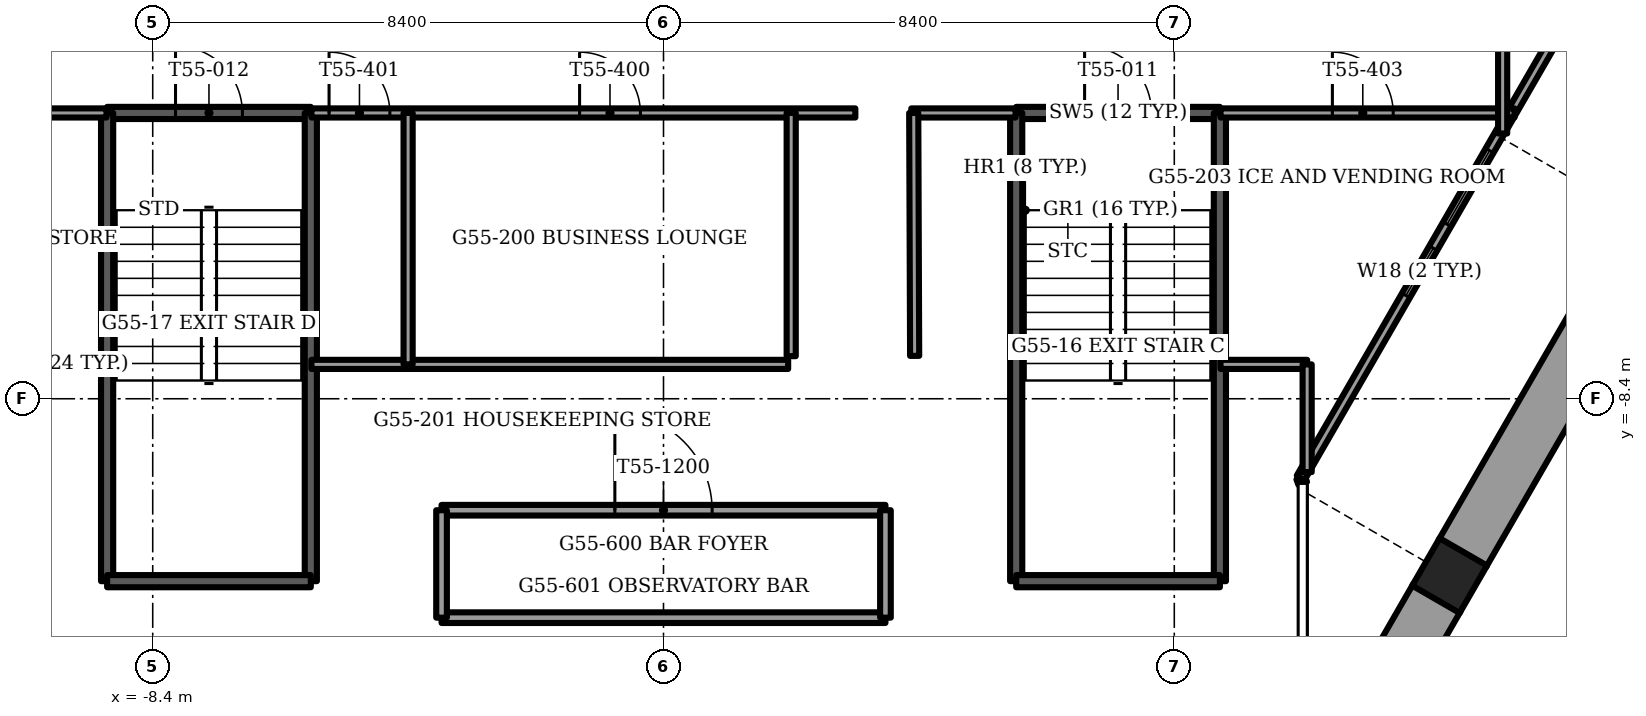
"""IFC4 building model, lengths in metres.
Left out: names, types, materials, properties, quantities, classifications, styles, units other than length and angle.
Written with IfcOpenShell. Run it as: python <this file> out.ifc"""

import sys

from ifc_helpers import new_model, si_unit, direction, frame, frame_2d, origin, origin_2d, place, context, subcontext, project, spatial, rectangle, extrude, element, fill, save


model = new_model("IFC4")
c1 = context("Model", 3, precision=1e-05, world=origin(), true_north=direction((0.0, 1.0)))
c2 = subcontext(c1, "Body", "Model", "MODEL_VIEW")
j1 = project(units=[si_unit("LENGTHUNIT", "METRE"), si_unit("PLANEANGLEUNIT", "RADIAN")], contexts=[c1])
p1 = place(None, origin())
s1 = spatial("IfcSite", under=j1, at=p1, CompositionType="ELEMENT")
p2 = place(p1, origin())
s2 = spatial("IfcBuilding", under=s1, at=p2, CompositionType="ELEMENT")
p3 = place(p2, frame((0.0, 0.0, 222.0)))
s3 = spatial("IfcBuildingStorey", under=s2, at=p3, CompositionType="ELEMENT", Elevation=222.0)
p4 = place(p3, frame((12.928, -11.308, -1.2), z_axis=(0.0, 0.0, 1.0), x_axis=(-0.5, -0.866025403784, 0.0)))
e1 = element("IfcColumn", 1, at=p4, inside=s3, PredefinedType="COLUMN", context=c2, shape_type="SweptSolid", body=[
    extrude(rectangle(XDim=0.9, YDim=0.9, at=origin_2d()), origin(), (0.0, 0.0, 1.0), 3.75),
])
for number, where, z_axis, x_axis in (
    (2, (-12.718, -11.672, 0.0), (0.0, 0.0, 1.0), (0.5, -0.866, 0.0)),
    (3, (10.066, -16.264, 0.0), (0.0, 0.0, 1.0), (0.5, 0.866, 0.0)),
):
    element("IfcWall", number, at=place(p3, frame(where, z_axis=z_axis, x_axis=x_axis)), inside=s3, PredefinedType="PARAPET", context=c2, shape_type="SweptSolid", body=[
        extrude(rectangle(XDim=5.303, YDim=0.9, at=frame_2d((2.651, 0.0))), origin(), (0.0, 0.0, 1.0), 1.1),
    ])
p5 = place(p3, frame((13.138, -10.945, 0.0), z_axis=(0.0, 0.0, 1.0), x_axis=(0.500015433515, 0.866016493057, 0.0)))
e4 = element("IfcWall", 4, at=p5, inside=s3, PredefinedType="PARAPET", context=c2, shape_type="SweptSolid", body=[
    extrude(rectangle(XDim=5.819, YDim=0.9, at=frame_2d((2.909, 0.0))), origin(), (0.0, 0.0, 1.0), 1.1),
])
p6 = place(p3, frame((10.479, -9.7, 0.0), z_axis=(0.0, 0.0, 1.0), x_axis=(0.49999822861, 0.866026426494, 0.0)))
e5 = element("IfcWall", 5, at=p6, inside=s3, PredefinedType="SOLIDWALL", context=c2, shape_type="SweptSolid", body=[
    extrude(rectangle(XDim=10.396, YDim=0.15, at=frame_2d((5.198, 0.0))), origin(), (0.0, 0.0, 1.0), 3.45),
])
p7 = place(p6, frame((3.461, 0.0, 0.15)))
e6 = element("IfcOpeningElement", 6, at=p7, cuts=e5, PredefinedType="OPENING", context=c2, shape_type="SweptSolid", body=[
    extrude(rectangle(XDim=0.9, YDim=2.2, at=frame_2d((0.45, 1.1))), frame((0.0, 0.075, 0.0), z_axis=(0.0, -1.0, 0.0), x_axis=(1.0, 0.0, 0.0)), (0.0, 0.0, 1.0), 0.15),
])
p8 = place(p6, frame((4.814, 0.0, 0.15)))
e7 = element("IfcOpeningElement", 7, at=p8, cuts=e5, PredefinedType="OPENING", context=c2, shape_type="SweptSolid", body=[
    extrude(rectangle(XDim=1.4, YDim=2.2, at=frame_2d((0.7, 1.1))), frame((0.0, 0.075, 0.0), z_axis=(0.0, -1.0, 0.0), x_axis=(1.0, 0.0, 0.0)), (0.0, 0.0, 1.0), 0.15),
])
p9 = place(p3, frame((10.479, -9.7, 0.0), z_axis=(0.0, 0.0, 1.0), x_axis=(0.338543167143, -0.940950861619, 0.0)))
e8 = element("IfcWall", 8, at=p9, inside=s3, PredefinedType="SOLIDWALL", context=c2, shape_type="SweptSolid", body=[
    extrude(rectangle(XDim=0.098, YDim=0.15, at=frame_2d((0.049, 0.0))), origin(), (0.0, 0.0, 1.0), 3.45),
])
p10 = place(p3, frame((5.8, -3.7, -0.3), z_axis=(0.0, 0.0, 1.0), x_axis=(1.0, 0.0, 0.0)))
e9 = element("IfcWall", 9, at=p10, inside=s3, PredefinedType="SOLIDWALL", context=c2, shape_type="SweptSolid", body=[
    extrude(rectangle(XDim=3.35, YDim=0.2, at=frame_2d((1.675, 0.0))), origin(), (0.0, 0.0, 1.0), 3.75),
])
p11 = place(p10, frame((1.125, 0.0, 0.0)))
e10 = element("IfcOpeningElement", 10, at=p11, cuts=e9, PredefinedType="OPENING", context=c2, shape_type="SweptSolid", body=[
    extrude(rectangle(XDim=1.1, YDim=2.1, at=frame_2d((0.55, 1.05))), frame((0.0, 0.1, 0.0), z_axis=(0.0, -1.0, 0.0), x_axis=(1.0, 0.0, 0.0)), (0.0, 0.0, 1.0), 0.2),
])
for number, where, z_axis, x_axis in (
    (11, (5.8, -3.7, -0.3), (0.0, 0.0, 1.0), (0.0, -1.0, 0.0)),
    (12, (9.15, -3.7, -0.3), (0.0, 0.0, 1.0), (0.0, -1.0, 0.0)),
):
    element("IfcWall", number, at=place(p3, frame(where, z_axis=z_axis, x_axis=x_axis)), inside=s3, PredefinedType="SOLIDWALL", context=c2, shape_type="SweptSolid", body=[
        extrude(rectangle(XDim=7.7, YDim=0.2, at=frame_2d((3.85, 0.0))), origin(), (0.0, 0.0, 1.0), 3.75),
    ])
p12 = place(p3, frame((5.8, -11.4, -0.3), z_axis=(0.0, 0.0, 1.0), x_axis=(1.0, 0.0, 0.0)))
e13 = element("IfcWall", 13, at=p12, inside=s3, PredefinedType="SOLIDWALL", context=c2, shape_type="SweptSolid", body=[
    extrude(rectangle(XDim=3.35, YDim=0.2, at=frame_2d((1.675, 0.0))), origin(), (0.0, 0.0, 1.0), 3.75),
])
p13 = place(p3, frame((-9.15, -3.7, -0.3), z_axis=(0.0, 0.0, 1.0), x_axis=(1.0, 0.0, 0.0)))
e14 = element("IfcWall", 14, at=p13, inside=s3, PredefinedType="SOLIDWALL", context=c2, shape_type="SweptSolid", body=[
    extrude(rectangle(XDim=3.35, YDim=0.2, at=frame_2d((1.675, 0.0))), origin(), (0.0, 0.0, 1.0), 3.75),
])
p14 = place(p13, frame((1.125, 0.0, 0.0)))
e15 = element("IfcOpeningElement", 15, at=p14, cuts=e14, PredefinedType="OPENING", context=c2, shape_type="SweptSolid", body=[
    extrude(rectangle(XDim=1.1, YDim=2.1, at=frame_2d((0.55, 1.05))), frame((0.0, 0.1, 0.0), z_axis=(0.0, -1.0, 0.0), x_axis=(1.0, 0.0, 0.0)), (0.0, 0.0, 1.0), 0.2),
])
for number, where, z_axis, x_axis in (
    (16, (-9.15, -3.7, -0.3), (0.0, 0.0, 1.0), (0.0, -1.0, 0.0)),
    (17, (-5.8, -3.7, -0.3), (0.0, 0.0, 1.0), (0.0, -1.0, 0.0)),
):
    element("IfcWall", number, at=place(p3, frame(where, z_axis=z_axis, x_axis=x_axis)), inside=s3, PredefinedType="SOLIDWALL", context=c2, shape_type="SweptSolid", body=[
        extrude(rectangle(XDim=7.7, YDim=0.2, at=frame_2d((3.85, 0.0))), origin(), (0.0, 0.0, 1.0), 3.75),
    ])
p15 = place(p3, frame((-9.15, -11.4, -0.3), z_axis=(0.0, 0.0, 1.0), x_axis=(1.0, 0.0, 0.0)))
e18 = element("IfcWall", 18, at=p15, inside=s3, PredefinedType="SOLIDWALL", context=c2, shape_type="SweptSolid", body=[
    extrude(rectangle(XDim=3.35, YDim=0.2, at=frame_2d((1.675, 0.0))), origin(), (0.0, 0.0, 1.0), 3.75),
])
p16 = place(p3, frame((-10.585, -7.835, 0.0), z_axis=(0.0, 0.0, 1.0), x_axis=(1.0, 0.0, 0.0)))
e19 = element("IfcWall", 19, at=p16, inside=s3, PredefinedType="PARTITIONING", context=c2, shape_type="SweptSolid", body=[
    extrude(rectangle(XDim=1.425, YDim=0.15, at=frame_2d((0.712, 0.0))), origin(), (0.0, 0.0, 1.0), 3.45),
])
p17 = place(p3, frame((-5.79, -7.835, 0.0), z_axis=(0.0, 0.0, 1.0), x_axis=(1.0, 0.0, 0.0)))
e20 = element("IfcWall", 20, at=p17, inside=s3, PredefinedType="PARTITIONING", context=c2, shape_type="SweptSolid", body=[
    extrude(rectangle(XDim=7.84, YDim=0.15, at=frame_2d((3.92, 0.0))), origin(), (0.0, 0.0, 1.0), 3.45),
])
p18 = place(p3, frame((9.16, -7.835, 0.0), z_axis=(0.0, 0.0, 1.0), x_axis=(1.0, 0.0, 0.0)))
e21 = element("IfcWall", 21, at=p18, inside=s3, PredefinedType="PARTITIONING", context=c2, shape_type="SweptSolid", body=[
    extrude(rectangle(XDim=1.425, YDim=0.15, at=frame_2d((0.712, 0.0))), origin(), (0.0, 0.0, 1.0), 3.45),
])
p19 = place(p3, frame((-13.995, -3.7, 0.0), z_axis=(0.0, 0.0, 1.0), x_axis=(1.0, 0.0, 0.0)))
e22 = element("IfcWall", 22, at=p19, inside=s3, PredefinedType="PARTITIONING", context=c2, shape_type="SweptSolid", body=[
    extrude(rectangle(XDim=4.835, YDim=0.15, at=frame_2d((2.417, 0.0))), origin(), (0.0, 0.0, 1.0), 3.45),
])
p20 = place(p19, frame((1.995, 0.0, 0.0)))
e23 = element("IfcOpeningElement", 23, at=p20, cuts=e22, PredefinedType="OPENING", context=c2, shape_type="SweptSolid", body=[
    extrude(rectangle(XDim=1.0, YDim=2.1, at=frame_2d((0.5, 1.05))), frame((0.0, 0.075, 0.0), z_axis=(0.0, -1.0, 0.0), x_axis=(1.0, 0.0, 0.0)), (0.0, 0.0, 1.0), 0.15),
])
p21 = place(p3, frame((-5.79, -3.7, 0.0), z_axis=(0.0, 0.0, 1.0), x_axis=(1.0, 0.0, 0.0)))
e24 = element("IfcWall", 24, at=p21, inside=s3, PredefinedType="PARTITIONING", context=c2, shape_type="SweptSolid", body=[
    extrude(rectangle(XDim=8.945, YDim=0.15, at=frame_2d((4.473, 0.0))), origin(), (0.0, 0.0, 1.0), 3.45),
])
p22 = place(p21, frame((4.41, 0.0, 0.0)))
e25 = element("IfcOpeningElement", 25, at=p22, cuts=e24, PredefinedType="OPENING", context=c2, shape_type="SweptSolid", body=[
    extrude(rectangle(XDim=1.0, YDim=2.1, at=frame_2d((0.5, 1.05))), frame((0.0, 0.075, 0.0), z_axis=(0.0, -1.0, 0.0), x_axis=(1.0, 0.0, 0.0)), (0.0, 0.0, 1.0), 0.15),
])
p23 = place(p21, frame((0.29, 0.0, 0.0)))
e26 = element("IfcOpeningElement", 26, at=p23, cuts=e24, PredefinedType="OPENING", context=c2, shape_type="SweptSolid", body=[
    extrude(rectangle(XDim=1.0, YDim=2.1, at=frame_2d((0.5, 1.05))), frame((0.0, 0.075, 0.0), z_axis=(0.0, -1.0, 0.0), x_axis=(1.0, 0.0, 0.0)), (0.0, 0.0, 1.0), 0.15),
])
p24 = place(p3, frame((4.075, -3.7, 0.0), z_axis=(0.0, 0.0, 1.0), x_axis=(1.0, 0.0, 0.0)))
e27 = element("IfcWall", 27, at=p24, inside=s3, PredefinedType="PARTITIONING", context=c2, shape_type="SweptSolid", body=[
    extrude(rectangle(XDim=1.715, YDim=0.15, at=frame_2d((0.857, 0.0))), origin(), (0.0, 0.0, 1.0), 3.45),
])
p25 = place(p3, frame((9.16, -3.7, 0.0), z_axis=(0.0, 0.0, 1.0), x_axis=(1.0, 0.0, 0.0)))
e28 = element("IfcWall", 28, at=p25, inside=s3, PredefinedType="PARTITIONING", context=c2, shape_type="SweptSolid", body=[
    extrude(rectangle(XDim=4.835, YDim=0.15, at=frame_2d((2.417, 0.0))), origin(), (0.0, 0.0, 1.0), 3.45),
])
p26 = place(p25, frame((1.84, 0.0, 0.0)))
e29 = element("IfcOpeningElement", 29, at=p26, cuts=e28, PredefinedType="OPENING", context=c2, shape_type="SweptSolid", body=[
    extrude(rectangle(XDim=1.0, YDim=2.1, at=frame_2d((0.5, 1.05))), frame((0.0, 0.075, 0.0), z_axis=(0.0, -1.0, 0.0), x_axis=(1.0, 0.0, 0.0)), (0.0, 0.0, 1.0), 0.15),
])
p27 = place(p3, frame((13.8, -4.038, 0.0), z_axis=(0.0, 0.0, 1.0), x_axis=(0.0, 1.0, 0.0)))
e30 = element("IfcWall", 30, at=p27, inside=s3, PredefinedType="PARTITIONING", context=c2, shape_type="SweptSolid", body=[
    extrude(rectangle(XDim=2.338, YDim=0.15, at=frame_2d((1.169, 0.0))), origin(), (0.0, 0.0, 1.0), 3.45),
])
p28 = place(p3, frame((10.585, -9.606, 0.0), z_axis=(0.0, 0.0, 1.0), x_axis=(0.0, 1.0, 0.0)))
e31 = element("IfcWall", 31, at=p28, inside=s3, PredefinedType="PARTITIONING", context=c2, shape_type="SweptSolid", body=[
    extrude(rectangle(XDim=1.771, YDim=0.15, at=frame_2d((0.885, 0.0))), origin(), (0.0, 0.0, 1.0), 3.45),
])
p29 = place(p3, frame((2.1, -7.7, 0.0), z_axis=(0.0, 0.0, 1.0), x_axis=(0.0, 1.0, 0.0)))
e32 = element("IfcWall", 32, at=p29, inside=s3, PredefinedType="PARTITIONING", context=c2, shape_type="SweptSolid", body=[
    extrude(rectangle(XDim=4.0, YDim=0.15, at=frame_2d((2.0, 0.0))), origin(), (0.0, 0.0, 1.0), 3.45),
])
p30 = place(p3, frame((-4.2, -7.835, 0.0), z_axis=(0.0, 0.0, 1.0), x_axis=(0.0, 1.0, 0.0)))
e33 = element("IfcWall", 33, at=p30, inside=s3, PredefinedType="PARTITIONING", context=c2, shape_type="SweptSolid", body=[
    extrude(rectangle(XDim=4.135, YDim=0.15, at=frame_2d((2.067, 0.0))), origin(), (0.0, 0.0, 1.0), 3.45),
])
p31 = place(p3, frame((4.13, -7.695, 0.0), z_axis=(0.0, 0.0, 1.0), x_axis=(-0.003727669041, 0.999993052218, 0.0)))
e34 = element("IfcWall", 34, at=p31, inside=s3, PredefinedType="PARTITIONING", context=c2, shape_type="SweptSolid", body=[
    extrude(rectangle(XDim=3.995, YDim=0.15, at=frame_2d((1.998, 0.0))), origin(), (0.0, 0.0, 1.0), 3.45),
])
p32 = place(p3, frame((-3.65, -12.0, 0.0), z_axis=(0.0, 0.0, 1.0), x_axis=(1.0, 0.0, 0.0)))
e35 = element("IfcWall", 35, at=p32, inside=s3, PredefinedType="PARTITIONING", context=c2, shape_type="SweptSolid", body=[
    extrude(rectangle(XDim=7.3, YDim=0.175, at=frame_2d((3.65, 0.0))), origin(), (0.0, 0.0, 1.0), 3.45),
])
p33 = place(p3, frame((-3.65, -10.233, 0.0), z_axis=(0.0, 0.0, 1.0), x_axis=(1.0, 0.0, 0.0)))
e36 = element("IfcWall", 36, at=p33, inside=s3, PredefinedType="PARTITIONING", context=c2, shape_type="SweptSolid", body=[
    extrude(rectangle(XDim=7.3, YDim=0.175, at=frame_2d((3.65, 0.0))), origin(), (0.0, 0.0, 1.0), 3.45),
])
p34 = place(p33, frame((2.85, 0.0, 0.0)))
e37 = element("IfcOpeningElement", 37, at=p34, cuts=e36, PredefinedType="OPENING", context=c2, shape_type="SweptSolid", body=[
    extrude(rectangle(XDim=1.6, YDim=2.1, at=frame_2d((0.8, 1.05))), frame((0.0, 0.087, 0.0), z_axis=(0.0, -1.0, 0.0), x_axis=(1.0, 0.0, 0.0)), (0.0, 0.0, 1.0), 0.175),
])
for number, where, z_axis, x_axis in (
    (38, (-3.65, -12.0, 0.0), (0.0, 0.0, 1.0), (0.0, 1.0, 0.0)),
    (39, (3.65, -12.0, 0.0), (0.0, 0.0, 1.0), (0.0, 1.0, 0.0)),
):
    element("IfcWall", number, at=place(p3, frame(where, z_axis=z_axis, x_axis=x_axis)), inside=s3, PredefinedType="PARTITIONING", context=c2, shape_type="SweptSolid", body=[
        extrude(rectangle(XDim=1.767, YDim=0.175, at=frame_2d((0.883, 0.0))), origin(), (0.0, 0.0, 1.0), 3.45),
    ])
p35 = place(p7, origin())
e40 = element("IfcWindow", 40, at=p35, inside=s3, PartitioningType="SINGLE_PANEL", PredefinedType="WINDOW", context=c2, shape_type="SweptSolid", body=[
    extrude(rectangle(XDim=0.9, YDim=2.2, at=frame_2d((0.45, 1.1))), frame((0.0, 0.03, 0.0), z_axis=(0.0, -1.0, 0.0), x_axis=(1.0, 0.0, 0.0)), (0.0, 0.0, 1.0), 0.06),
])
fill(e6, e40)
p36 = place(p8, origin())
e41 = element("IfcWindow", 41, at=p36, inside=s3, PartitioningType="SINGLE_PANEL", PredefinedType="WINDOW", context=c2, shape_type="SweptSolid", body=[
    extrude(rectangle(XDim=1.4, YDim=2.2, at=frame_2d((0.7, 1.1))), frame((0.0, 0.03, 0.0), z_axis=(0.0, -1.0, 0.0), x_axis=(1.0, 0.0, 0.0)), (0.0, 0.0, 1.0), 0.06),
])
fill(e7, e41)
p37 = place(p11, origin())
e42 = element("IfcDoor", 42, at=p37, inside=s3, OperationType="SINGLE_SWING_LEFT", PredefinedType="DOOR", context=c2, shape_type="SweptSolid", body=[
    extrude(rectangle(XDim=1.1, YDim=2.1, at=frame_2d((0.55, 1.05))), frame((0.0, 0.025, 0.0), z_axis=(0.0, -1.0, 0.0), x_axis=(1.0, 0.0, 0.0)), (0.0, 0.0, 1.0), 0.05),
])
fill(e10, e42)
p38 = place(p14, origin())
e43 = element("IfcDoor", 43, at=p38, inside=s3, OperationType="SINGLE_SWING_LEFT", PredefinedType="DOOR", context=c2, shape_type="SweptSolid", body=[
    extrude(rectangle(XDim=1.1, YDim=2.1, at=frame_2d((0.55, 1.05))), frame((0.0, 0.025, 0.0), z_axis=(0.0, -1.0, 0.0), x_axis=(1.0, 0.0, 0.0)), (0.0, 0.0, 1.0), 0.05),
])
fill(e15, e43)
p39 = place(p22, origin())
e44 = element("IfcDoor", 44, at=p39, inside=s3, OperationType="SINGLE_SWING_LEFT", PredefinedType="DOOR", context=c2, shape_type="SweptSolid", body=[
    extrude(rectangle(XDim=1.0, YDim=2.1, at=frame_2d((0.5, 1.05))), frame((0.0, 0.025, 0.0), z_axis=(0.0, -1.0, 0.0), x_axis=(1.0, 0.0, 0.0)), (0.0, 0.0, 1.0), 0.05),
])
fill(e25, e44)
p40 = place(p23, origin())
e45 = element("IfcDoor", 45, at=p40, inside=s3, OperationType="SINGLE_SWING_RIGHT", PredefinedType="DOOR", context=c2, shape_type="SweptSolid", body=[
    extrude(rectangle(XDim=1.0, YDim=2.1, at=frame_2d((0.5, 1.05))), frame((0.0, 0.025, 0.0), z_axis=(0.0, -1.0, 0.0), x_axis=(1.0, 0.0, 0.0)), (0.0, 0.0, 1.0), 0.05),
])
fill(e26, e45)
p41 = place(p26, origin())
e46 = element("IfcDoor", 46, at=p41, inside=s3, OperationType="SINGLE_SWING_LEFT", PredefinedType="DOOR", context=c2, shape_type="SweptSolid", body=[
    extrude(rectangle(XDim=1.0, YDim=2.1, at=frame_2d((0.5, 1.05))), frame((0.0, 0.025, 0.0), z_axis=(0.0, -1.0, 0.0), x_axis=(1.0, 0.0, 0.0)), (0.0, 0.0, 1.0), 0.05),
])
fill(e29, e46)
p42 = place(p34, origin())
e47 = element("IfcDoor", 47, at=p42, inside=s3, OperationType="DOUBLE_DOOR_SINGLE_SWING", PredefinedType="DOOR", context=c2, shape_type="SweptSolid", body=[
    extrude(rectangle(XDim=1.6, YDim=2.1, at=frame_2d((0.8, 1.05))), frame((0.0, 0.025, 0.0), z_axis=(0.0, -1.0, 0.0), x_axis=(1.0, 0.0, 0.0)), (0.0, 0.0, 1.0), 0.05),
])
fill(e37, e47)
save(model, sys.argv[1])
